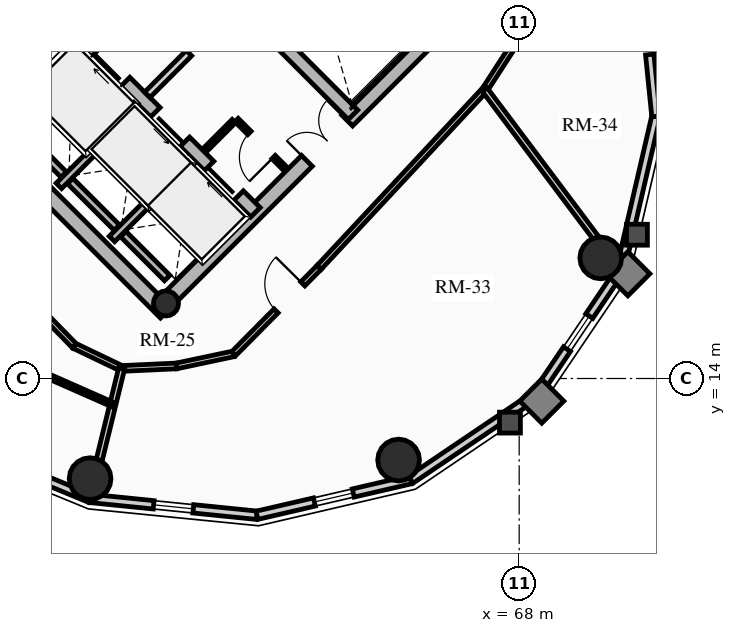
"""IFC4 building model, lengths in metres.
Left out: names, types, materials, properties, quantities, classifications, styles, units other than length and angle.
Written with IfcOpenShell. Run it as: python <this file> out.ifc"""

import sys

from ifc_helpers import new_model, si_unit, direction, frame, frame_2d, origin, origin_2d, place, context, subcontext, project, spatial, rectangle, circle, hollow_circle, extrude, source, transform, mapped, element, fill, save


model = new_model("IFC4")
c1 = context("Model", 3, precision=1e-05, world=origin(), true_north=direction((0.0, 1.0)))
c2 = subcontext(c1, "Body", "Model", "MODEL_VIEW")
j1 = project(units=[si_unit("LENGTHUNIT", "METRE"), si_unit("PLANEANGLEUNIT", "RADIAN")], contexts=[c1])
p1 = place(None, origin())
s1 = spatial("IfcSite", under=j1, at=p1, CompositionType="ELEMENT")
p2 = place(p1, origin())
s2 = spatial("IfcBuilding", under=s1, at=p2, CompositionType="ELEMENT")
p3 = place(p2, frame((0.0, 0.0, 214.12)))
s3 = spatial("IfcBuildingStorey", under=s2, at=p3, CompositionType="ELEMENT", Elevation=214.12)
p4 = place(p3, frame((58.702, 15.732, 0.0), z_axis=(0.0, 0.0, 1.0), x_axis=(-0.707106781187, 0.707106781187, 0.0)))
e1 = element("IfcWall", 1, at=p4, inside=s3, PredefinedType="SHEAR", context=c2, shape_type="SweptSolid", body=[
    extrude(rectangle(XDim=14.1, YDim=0.4, at=frame_2d((7.05, 0.0))), origin(), (0.0, 0.0, 1.0), 2.91),
])
p5 = place(p3, frame((58.561, 15.873, 0.0), z_axis=(0.0, 0.0, 1.0), x_axis=(0.707106781187, 0.707106781187, 0.0)))
e2 = element("IfcWall", 2, at=p5, inside=s3, PredefinedType="SHEAR", context=c2, shape_type="SweptSolid", body=[
    extrude(rectangle(XDim=10.7, YDim=0.4, at=frame_2d((5.35, 0.0))), origin(), (0.0, 0.0, 1.0), 2.91),
])
m1 = source(origin(), c2, "Body", "SweptSolid", [
    extrude(rectangle(XDim=1.5, YDim=2.02, at=frame_2d((0.75, 1.01))), frame((0.0, 0.21, 0.0), z_axis=(0.0, -1.0, 0.0), x_axis=(1.0, 0.0, 0.0)), (0.0, 0.0, 1.0), 0.42),
])
p6 = place(p5, frame((5.45, 0.0, 0.0)))
e3 = element("IfcOpeningElement", 3, at=p6, cuts=e2, PredefinedType="OPENING", context=c2, shape_type="MappedRepresentation", body=[
    mapped(m1, transform((0.0, 0.0, 0.0), x_axis=(1.0, 0.0, 0.0), y_axis=(0.0, 1.0, 0.0), z_axis=(0.0, 0.0, 1.0), scale=1.0)),
])
p7 = place(p3, frame((61.06, 18.373, 0.0), z_axis=(0.0, 0.0, 1.0), x_axis=(-0.707106781187, 0.707106781187, 0.0)))
e4 = element("IfcWall", 4, at=p7, inside=s3, PredefinedType="SHEAR", context=c2, shape_type="SweptSolid", body=[
    extrude(rectangle(XDim=13.7, YDim=0.35, at=frame_2d((6.85, 0.0))), origin(), (0.0, 0.0, 1.0), 2.91),
])
m2 = source(origin(), c2, "Body", "SweptSolid", [
    extrude(rectangle(XDim=1.1, YDim=2.015, at=frame_2d((0.55, 1.007))), frame((0.0, 0.185, 0.0), z_axis=(0.0, -1.0, 0.0), x_axis=(1.0, 0.0, 0.0)), (0.0, 0.0, 1.0), 0.37),
])
p8 = place(p7, frame((4.85, 0.0, 0.0)))
e5 = element("IfcOpeningElement", 5, at=p8, cuts=e4, PredefinedType="OPENING", context=c2, shape_type="MappedRepresentation", body=[
    mapped(m2, transform((0.0, 0.0, 0.0), x_axis=(1.0, 0.0, 0.0), y_axis=(0.0, 1.0, 0.0), z_axis=(0.0, 0.0, 1.0), scale=1.0)),
])
p9 = place(p7, frame((0.625, 0.0, 0.0)))
e6 = element("IfcOpeningElement", 6, at=p9, cuts=e4, PredefinedType="OPENING", context=c2, shape_type="MappedRepresentation", body=[
    mapped(m2, transform((0.0, 0.0, 0.0), x_axis=(1.0, 0.0, 0.0), y_axis=(0.0, 1.0, 0.0), z_axis=(0.0, 0.0, 1.0), scale=1.0)),
])
p10 = place(p7, frame((2.625, 0.0, 0.0)))
e7 = element("IfcOpeningElement", 7, at=p10, cuts=e4, PredefinedType="OPENING", context=c2, shape_type="MappedRepresentation", body=[
    mapped(m2, transform((0.0, 0.0, 0.0), x_axis=(1.0, 0.0, 0.0), y_axis=(0.0, 1.0, 0.0), z_axis=(0.0, 0.0, 1.0), scale=1.0)),
])
m3 = source(origin(), c2, "Body", "SweptSolid", [
    extrude(rectangle(XDim=1.15, YDim=2.02, at=frame_2d((0.575, 1.01))), frame((0.0, 0.185, 0.0), z_axis=(0.0, -1.0, 0.0), x_axis=(1.0, 0.0, 0.0)), (0.0, 0.0, 1.0), 0.37),
])
p11 = place(p7, frame((7.27, 0.0, 0.0)))
e8 = element("IfcOpeningElement", 8, at=p11, cuts=e4, PredefinedType="OPENING", context=c2, shape_type="MappedRepresentation", body=[
    mapped(m3, transform((0.0, 0.0, 0.0), x_axis=(1.0, 0.0, 0.0), y_axis=(0.0, 1.0, 0.0), z_axis=(0.0, 0.0, 1.0), scale=1.0)),
])
p12 = place(p3, frame((63.627, 20.94, 0.0), z_axis=(0.0, 0.0, 1.0), x_axis=(-0.707119496762, 0.707094065383, 0.0)))
e9 = element("IfcWall", 9, at=p12, inside=s3, PredefinedType="SHEAR", context=c2, shape_type="SweptSolid", body=[
    extrude(rectangle(XDim=9.6, YDim=0.35, at=frame_2d((4.8, 0.0))), origin(), (0.0, 0.0, 1.0), 2.91),
])
p13 = place(p12, frame((5.28, 0.0, 0.0)))
e10 = element("IfcOpeningElement", 10, at=p13, cuts=e9, PredefinedType="OPENING", context=c2, shape_type="MappedRepresentation", body=[
    mapped(m3, transform((0.0, 0.0, 0.0), x_axis=(1.0, 0.0, 0.0), y_axis=(0.0, 1.0, 0.0), z_axis=(0.0, 0.0, 1.0), scale=1.0)),
])
p14 = place(p3, frame((53.784, 21.003, 0.0), z_axis=(0.0, 0.0, 1.0), x_axis=(0.707106781187, 0.707106781187, 0.0)))
e11 = element("IfcWall", 11, at=p14, inside=s3, PredefinedType="SHEAR", context=c2, shape_type="SweptSolid", body=[
    extrude(rectangle(XDim=3.285, YDim=0.35, at=frame_2d((1.643, 0.0))), origin(), (0.0, 0.0, 1.0), 2.91),
])
p15 = place(p3, frame((58.706, 15.976, 0.0), z_axis=(0.0, 0.0, 1.0), x_axis=(0.707106781187, 0.707106781187, 0.0)))
e12 = element("IfcColumn", 12, at=p15, inside=s3, PredefinedType="COLUMN", context=c2, shape_type="SweptSolid", body=[
    extrude(hollow_circle(Radius=0.33, WallThickness=0.025, at=origin_2d()), origin(), (0.0, 0.0, 1.0), 2.91),
])
for number, where, z_axis, x_axis in (
    (13, (56.709, 11.365, 0.0), (0.0, 0.0, 1.0), (1.0, 0.0, 0.0)),
    (14, (64.827, 11.854, 0.0), (0.0, 0.0, 1.0), (1.0, 0.0, 0.0)),
    (15, (70.146, 17.173, 0.0), (0.0, 0.0, 1.0), (1.0, 0.0, 0.0)),
):
    element("IfcColumn", number, at=place(p3, frame(where, z_axis=z_axis, x_axis=x_axis)), inside=s3, PredefinedType="USERDEFINED", context=c2, shape_type="SweptSolid", body=[
        extrude(circle(Radius=0.55, at=origin_2d()), origin(), (0.0, 0.0, 1.0), 2.91),
    ])
p16 = place(p3, frame((56.705, 10.845, 0.0), z_axis=(0.0, 0.0, 1.0), x_axis=(-0.924447353237, 0.381309704956, 0.0)))
e16 = element("IfcWall", 16, at=p16, inside=s3, PredefinedType="SOLIDWALL", context=c2, shape_type="SweptSolid", body=[
    extrude(rectangle(XDim=4.671, YDim=0.22, at=frame_2d((2.335, 0.0))), origin(), (0.0, 0.0, 1.0), 2.322),
])
p17 = place(p3, frame((61.1, 10.401, 0.0), z_axis=(0.0, 0.0, 1.0), x_axis=(-0.994929930991, 0.100570534541, 0.0)))
e17 = element("IfcWall", 17, at=p17, inside=s3, PredefinedType="SOLIDWALL", context=c2, shape_type="SweptSolid", body=[
    extrude(rectangle(XDim=4.418, YDim=0.22, at=frame_2d((2.209, 0.0))), origin(), (0.0, 0.0, 1.0), 2.322),
])
m4 = source(origin(), c2, "Body", "SweptSolid", [
    extrude(rectangle(XDim=1.05, YDim=1.3, at=frame_2d((0.525, 0.65))), frame((0.0, 0.12, 0.0), z_axis=(0.0, -1.0, 0.0), x_axis=(1.0, 0.0, 0.0)), (0.0, 0.0, 1.0), 0.24),
])
p18 = place(p17, frame((1.684, 0.0, 0.65)))
e18 = element("IfcOpeningElement", 18, at=p18, cuts=e17, PredefinedType="OPENING", context=c2, shape_type="MappedRepresentation", body=[
    mapped(m4, transform((0.0, 0.0, 0.0), x_axis=(1.0, 0.0, 0.0), y_axis=(0.0, 1.0, 0.0), z_axis=(0.0, 0.0, 1.0), scale=1.0)),
])
p19 = place(p3, frame((65.144, 11.337, 0.0), z_axis=(0.0, 0.0, 1.0), x_axis=(-0.974249228678, -0.225473813158, 0.0)))
e19 = element("IfcWall", 19, at=p19, inside=s3, PredefinedType="SOLIDWALL", context=c2, shape_type="SweptSolid", body=[
    extrude(rectangle(XDim=4.15, YDim=0.22, at=frame_2d((2.075, 0.0))), origin(), (0.0, 0.0, 1.0), 2.322),
])
p20 = place(p19, frame((1.55, 0.0, 0.65)))
e20 = element("IfcOpeningElement", 20, at=p20, cuts=e19, PredefinedType="OPENING", context=c2, shape_type="MappedRepresentation", body=[
    mapped(m4, transform((0.0, 0.0, 0.0), x_axis=(1.0, 0.0, 0.0), y_axis=(0.0, 1.0, 0.0), z_axis=(0.0, 0.0, 1.0), scale=1.0)),
])
p21 = place(p3, frame((68.439, 13.561, 0.0), z_axis=(0.0, 0.0, 1.0), x_axis=(-0.828833723692, -0.559495003079, 0.0)))
e21 = element("IfcWall", 21, at=p21, inside=s3, PredefinedType="SOLIDWALL", context=c2, shape_type="SweptSolid", body=[
    extrude(rectangle(XDim=3.976, YDim=0.22, at=frame_2d((1.988, 0.0))), origin(), (0.0, 0.0, 1.0), 2.322),
])
p22 = place(p3, frame((70.663, 16.856, 0.0), z_axis=(0.0, 0.0, 1.0), x_axis=(-0.559495003079, -0.828833723692, 0.0)))
e22 = element("IfcWall", 22, at=p22, inside=s3, PredefinedType="SOLIDWALL", context=c2, shape_type="SweptSolid", body=[
    extrude(rectangle(XDim=3.976, YDim=0.22, at=frame_2d((1.988, 0.0))), origin(), (0.0, 0.0, 1.0), 2.322),
])
p23 = place(p22, frame((1.463, 0.0, 0.65)))
e23 = element("IfcOpeningElement", 23, at=p23, cuts=e22, PredefinedType="OPENING", context=c2, shape_type="MappedRepresentation", body=[
    mapped(m4, transform((0.0, 0.0, 0.0), x_axis=(1.0, 0.0, 0.0), y_axis=(0.0, 1.0, 0.0), z_axis=(0.0, 0.0, 1.0), scale=1.0)),
])
p24 = place(p3, frame((71.599, 20.9, 0.0), z_axis=(0.0, 0.0, 1.0), x_axis=(-0.225473813158, -0.974249228678, 0.0)))
e24 = element("IfcWall", 24, at=p24, inside=s3, PredefinedType="SOLIDWALL", context=c2, shape_type="SweptSolid", body=[
    extrude(rectangle(XDim=4.15, YDim=0.22, at=frame_2d((2.075, 0.0))), origin(), (0.0, 0.0, 1.0), 2.322),
])
p25 = place(p3, frame((71.155, 25.295, 0.0), z_axis=(0.0, 0.0, 1.0), x_axis=(0.100570534541, -0.994929930991, 0.0)))
e25 = element("IfcWall", 25, at=p25, inside=s3, PredefinedType="SOLIDWALL", context=c2, shape_type="SweptSolid", body=[
    extrude(rectangle(XDim=4.418, YDim=0.22, at=frame_2d((2.209, 0.0))), origin(), (0.0, 0.0, 1.0), 2.322),
])
m5 = source(origin(), c2, "Body", "SweptSolid", [
    extrude(rectangle(XDim=1.15, YDim=2.005, at=frame_2d((0.575, 1.002))), frame((0.0, 0.12, 0.0), z_axis=(0.0, -1.0, 0.0), x_axis=(1.0, 0.0, 0.0)), (0.0, 0.0, 1.0), 0.24),
])
p26 = place(p25, frame((1.634, 0.0, 0.0)))
e26 = element("IfcOpeningElement", 26, at=p26, cuts=e25, PredefinedType="OPENING", context=c2, shape_type="MappedRepresentation", body=[
    mapped(m5, transform((0.0, 0.0, 0.0), x_axis=(1.0, 0.0, 0.0), y_axis=(0.0, 1.0, 0.0), z_axis=(0.0, 0.0, 1.0), scale=1.0)),
])
p27 = place(p3, frame((55.888, 19.069, 0.0), z_axis=(0.0, 0.0, 1.0), x_axis=(0.707106781187, 0.707106781187, 0.0)))
e27 = element("IfcWall", 27, at=p27, inside=s3, PredefinedType="SHEAR", context=c2, shape_type="SweptSolid", body=[
    extrude(rectangle(XDim=2.97, YDim=0.2, at=frame_2d((1.485, 0.0))), origin(), (0.0, 0.0, 1.0), 2.91),
])
p28 = place(p3, frame((56.015, 19.366, 0.0), z_axis=(0.0, 0.0, 1.0), x_axis=(-0.707106781187, 0.707106781187, 0.0)))
e28 = element("IfcWall", 28, at=p28, inside=s3, PredefinedType="SHEAR", context=c2, shape_type="SweptSolid", body=[
    extrude(rectangle(XDim=2.44, YDim=0.2, at=frame_2d((1.22, 0.0))), origin(), (0.0, 0.0, 1.0), 2.91),
])
p29 = place(p3, frame((57.284, 17.673, 0.0), z_axis=(0.0, 0.0, 1.0), x_axis=(0.707147878904, 0.70706568108, 0.0)))
e29 = element("IfcWall", 29, at=p29, inside=s3, PredefinedType="SHEAR", context=c2, shape_type="SweptSolid", body=[
    extrude(rectangle(XDim=2.97, YDim=0.2, at=frame_2d((1.485, 0.0))), origin(), (0.0, 0.0, 1.0), 2.91),
])
p30 = place(p3, frame((57.412, 17.97, 0.0), z_axis=(0.0, 0.0, 1.0), x_axis=(-0.707106781187, 0.707106781187, 0.0)))
e30 = element("IfcWall", 30, at=p30, inside=s3, PredefinedType="SHEAR", context=c2, shape_type="SweptSolid", body=[
    extrude(rectangle(XDim=1.735, YDim=0.2, at=frame_2d((0.867, 0.0))), origin(), (0.0, 0.0, 1.0), 2.91),
])
p31 = place(p3, frame((58.737, 16.644, 0.0), z_axis=(0.0, 0.0, 1.0), x_axis=(-0.707032117043, 0.707181437447, 0.0)))
e31 = element("IfcWall", 31, at=p31, inside=s3, PredefinedType="SHEAR", context=c2, shape_type="SweptSolid", body=[
    extrude(rectangle(XDim=1.635, YDim=0.2, at=frame_2d((0.817, 0.0))), origin(), (0.0, 0.0, 1.0), 2.91),
])
p32 = place(p3, frame((58.214, 21.467, 0.0), z_axis=(0.0, 0.0, 1.0), x_axis=(0.707106781187, 0.707106781187, 0.0)))
e32 = element("IfcWall", 32, at=p32, inside=s3, PredefinedType="PARTITIONING", context=c2, shape_type="SweptSolid", body=[
    extrude(rectangle(XDim=3.28, YDim=0.2, at=frame_2d((1.64, 0.0))), origin(), (0.0, 0.0, 1.0), 2.685),
])
m6 = source(origin(), c2, "Body", "SweptSolid", [
    extrude(rectangle(XDim=1.5, YDim=2.02, at=frame_2d((0.75, 1.01))), frame((0.0, 0.11, 0.0), z_axis=(0.0, -1.0, 0.0), x_axis=(1.0, 0.0, 0.0)), (0.0, 0.0, 1.0), 0.22),
])
p33 = place(p32, frame((1.55, 0.0, 0.0)))
e33 = element("IfcOpeningElement", 33, at=p33, cuts=e32, PredefinedType="OPENING", context=c2, shape_type="MappedRepresentation", body=[
    mapped(m6, transform((0.0, 0.0, 0.0), x_axis=(1.0, 0.0, 0.0), y_axis=(0.0, 1.0, 0.0), z_axis=(0.0, 0.0, 1.0), scale=1.0)),
])
p34 = place(p3, frame((61.835, 19.529, 0.0), z_axis=(0.0, 0.0, 1.0), x_axis=(-0.707174592913, 0.707038962956, 0.0)))
e34 = element("IfcWall", 34, at=p34, inside=s3, PredefinedType="PARTITIONING", context=c2, shape_type="SweptSolid", body=[
    extrude(rectangle(XDim=1.8, YDim=0.125, at=frame_2d((0.9, 0.0))), origin(), (0.0, 0.0, 1.0), 2.685),
])
m7 = source(origin(), c2, "Body", "SweptSolid", [
    extrude(rectangle(XDim=0.9, YDim=2.005, at=frame_2d((0.45, 1.002))), frame((0.0, 0.073, 0.0), z_axis=(0.0, -1.0, 0.0), x_axis=(1.0, 0.0, 0.0)), (0.0, 0.0, 1.0), 0.145),
])
p35 = place(p34, frame((0.42, 0.0, 0.0)))
e35 = element("IfcOpeningElement", 35, at=p35, cuts=e34, PredefinedType="OPENING", context=c2, shape_type="MappedRepresentation", body=[
    mapped(m7, transform((0.0, 0.0, 0.0), x_axis=(1.0, 0.0, 0.0), y_axis=(0.0, 1.0, 0.0), z_axis=(0.0, 0.0, 1.0), scale=1.0)),
])
p36 = place(p3, frame((59.713, 19.996, 0.0), z_axis=(0.0, 0.0, 1.0), x_axis=(0.707217726, 0.706995818963, 0.0)))
e36 = element("IfcWall", 36, at=p36, inside=s3, PredefinedType="PARTITIONING", context=c2, shape_type="SweptSolid", body=[
    extrude(rectangle(XDim=1.1, YDim=0.125, at=frame_2d((0.55, 0.0))), origin(), (0.0, 0.0, 1.0), 2.685),
])
p37 = place(p3, frame((52.126, 19.126, 0.0), z_axis=(0.0, 0.0, 1.0), x_axis=(0.698979087027, -0.715142108884, 0.0)))
e37 = element("IfcWall", 37, at=p37, inside=s3, PredefinedType="PARTITIONING", context=c2, shape_type="SweptSolid", body=[
    extrude(rectangle(XDim=5.966, YDim=0.15, at=frame_2d((2.983, 0.0))), origin(), (0.0, 0.0, 1.0), 2.322),
])
m8 = source(origin(), c2, "Body", "SweptSolid", [
    extrude(rectangle(XDim=1.05, YDim=2.015, at=frame_2d((0.525, 1.007))), frame((0.0, 0.085, 0.0), z_axis=(0.0, -1.0, 0.0), x_axis=(1.0, 0.0, 0.0)), (0.0, 0.0, 1.0), 0.17),
])
p38 = place(p37, frame((2.458, 0.0, 0.0)))
e38 = element("IfcOpeningElement", 38, at=p38, cuts=e37, PredefinedType="OPENING", context=c2, shape_type="MappedRepresentation", body=[
    mapped(m8, transform((0.0, 0.0, 0.0), x_axis=(1.0, 0.0, 0.0), y_axis=(0.0, 1.0, 0.0), z_axis=(0.0, 0.0, 1.0), scale=1.0)),
])
p39 = place(p3, frame((56.296, 14.859, 0.0), z_axis=(0.0, 0.0, 1.0), x_axis=(0.90178292445, -0.432189260823, 0.0)))
e39 = element("IfcWall", 39, at=p39, inside=s3, PredefinedType="PARTITIONING", context=c2, shape_type="SweptSolid", body=[
    extrude(rectangle(XDim=1.377, YDim=0.15, at=frame_2d((0.688, 0.0))), origin(), (0.0, 0.0, 1.0), 2.255),
])
p40 = place(p3, frame((57.538, 14.264, 0.0), z_axis=(0.0, 0.0, 1.0), x_axis=(0.99892990172, 0.046249880546, 0.0)))
e40 = element("IfcWall", 40, at=p40, inside=s3, PredefinedType="PARTITIONING", context=c2, shape_type="SweptSolid", body=[
    extrude(rectangle(XDim=1.446, YDim=0.15, at=frame_2d((0.723, 0.0))), origin(), (0.0, 0.0, 1.0), 2.322),
])
p41 = place(p3, frame((58.983, 14.331, 0.0), z_axis=(0.0, 0.0, 1.0), x_axis=(0.978328007546, 0.207061125397, 0.0)))
e41 = element("IfcWall", 41, at=p41, inside=s3, PredefinedType="PARTITIONING", context=c2, shape_type="SweptSolid", body=[
    extrude(rectangle(XDim=1.534, YDim=0.15, at=frame_2d((0.767, 0.0))), origin(), (0.0, 0.0, 1.0), 2.255),
])
p42 = place(p3, frame((60.484, 14.648, 0.0), z_axis=(0.0, 0.0, 1.0), x_axis=(0.703398221944, 0.710795991383, 0.0)))
e42 = element("IfcWall", 42, at=p42, inside=s3, PredefinedType="PARTITIONING", context=c2, shape_type="SweptSolid", body=[
    extrude(rectangle(XDim=3.201, YDim=0.15, at=frame_2d((1.601, 0.0))), origin(), (0.0, 0.0, 1.0), 2.322),
])
m9 = source(origin(), c2, "Body", "SweptSolid", [
    extrude(rectangle(XDim=1.0, YDim=2.015, at=frame_2d((0.5, 1.007))), frame((0.0, 0.085, 0.0), z_axis=(0.0, -1.0, 0.0), x_axis=(1.0, 0.0, 0.0)), (0.0, 0.0, 1.0), 0.17),
])
p43 = place(p42, frame((1.591, 0.0, 0.0)))
e43 = element("IfcOpeningElement", 43, at=p43, cuts=e42, PredefinedType="OPENING", context=c2, shape_type="MappedRepresentation", body=[
    mapped(m9, transform((0.0, 0.0, 0.0), x_axis=(1.0, 0.0, 0.0), y_axis=(0.0, 1.0, 0.0), z_axis=(0.0, 0.0, 1.0), scale=1.0)),
])
p44 = place(p3, frame((62.736, 16.924, 0.0), z_axis=(0.0, 0.0, 1.0), x_axis=(0.681946700833, 0.731401871219, 0.0)))
e44 = element("IfcWall", 44, at=p44, inside=s3, PredefinedType="PARTITIONING", context=c2, shape_type="SweptSolid", body=[
    extrude(rectangle(XDim=6.393, YDim=0.15, at=frame_2d((3.196, 0.0))), origin(), (0.0, 0.0, 1.0), 2.255),
])
p45 = place(p3, frame((67.095, 21.6, 0.0), z_axis=(0.0, 0.0, 1.0), x_axis=(0.543773190184, 0.839232219137, 0.0)))
e45 = element("IfcWall", 45, at=p45, inside=s3, PredefinedType="PARTITIONING", context=c2, shape_type="SweptSolid", body=[
    extrude(rectangle(XDim=1.823, YDim=0.15, at=frame_2d((0.911, 0.0))), origin(), (0.0, 0.0, 1.0), 2.255),
])
p46 = place(p3, frame((57.538, 14.264, 0.0), z_axis=(0.0, 0.0, 1.0), x_axis=(-0.237377006249, -0.971417601706, 0.0)))
e46 = element("IfcWall", 46, at=p46, inside=s3, PredefinedType="PARTITIONING", context=c2, shape_type="SweptSolid", body=[
    extrude(rectangle(XDim=3.499, YDim=0.16, at=frame_2d((1.75, 0.0))), origin(), (0.0, 0.0, 1.0), 2.322),
])
p47 = place(p3, frame((67.095, 21.6, 0.0), z_axis=(0.0, 0.0, 1.0), x_axis=(0.599947190798, -0.800039604178, 0.0)))
e47 = element("IfcWall", 47, at=p47, inside=s3, PredefinedType="PARTITIONING", context=c2, shape_type="SweptSolid", body=[
    extrude(rectangle(XDim=5.918, YDim=0.16, at=frame_2d((2.959, 0.0))), origin(), (0.0, 0.0, 1.0), 2.322),
])
p48 = place(p3, frame((55.204, 14.239, 0.0), z_axis=(0.0, 0.0, 1.0), x_axis=(0.914999746908, -0.403454412738, 0.0)))
e48 = element("IfcWall", 48, at=p48, inside=s3, PredefinedType="PARTITIONING", context=c2, shape_type="SweptSolid", body=[
    extrude(rectangle(XDim=2.297, YDim=0.125, at=frame_2d((1.148, 0.0))), origin(), (0.0, 0.0, 1.0), 2.255),
])
m10 = source(origin(), c2, "Body", "SweptSolid", [
    extrude(rectangle(XDim=1.05, YDim=1.3, at=frame_2d((0.525, 0.65))), frame((0.0, 0.03, 0.0), z_axis=(0.0, -1.0, 0.0), x_axis=(1.0, 0.0, 0.0)), (0.0, 0.0, 1.0), 0.06),
])
p49 = place(p18, origin())
e49 = element("IfcWindow", 49, at=p49, inside=s3, PartitioningType="SINGLE_PANEL", PredefinedType="WINDOW", context=c2, shape_type="MappedRepresentation", body=[
    mapped(m10, transform((0.0, 0.0, 0.0), x_axis=(1.0, 0.0, 0.0), y_axis=(0.0, 1.0, 0.0), z_axis=(0.0, 0.0, 1.0), scale=1.0)),
])
fill(e18, e49)
p50 = place(p20, origin())
e50 = element("IfcWindow", 50, at=p50, inside=s3, PartitioningType="SINGLE_PANEL", PredefinedType="WINDOW", context=c2, shape_type="MappedRepresentation", body=[
    mapped(m10, transform((0.0, 0.0, 0.0), x_axis=(1.0, 0.0, 0.0), y_axis=(0.0, 1.0, 0.0), z_axis=(0.0, 0.0, 1.0), scale=1.0)),
])
fill(e20, e50)
p51 = place(p23, origin())
e51 = element("IfcWindow", 51, at=p51, inside=s3, PartitioningType="SINGLE_PANEL", PredefinedType="WINDOW", context=c2, shape_type="MappedRepresentation", body=[
    mapped(m10, transform((0.0, 0.0, 0.0), x_axis=(1.0, 0.0, 0.0), y_axis=(0.0, 1.0, 0.0), z_axis=(0.0, 0.0, 1.0), scale=1.0)),
])
fill(e23, e51)
m11 = source(origin(), c2, "Body", "SweptSolid", [
    extrude(rectangle(XDim=1.15, YDim=2.005, at=frame_2d((0.575, 1.002))), frame((0.0, 0.025, 0.0), z_axis=(0.0, -1.0, 0.0), x_axis=(1.0, 0.0, 0.0)), (0.0, 0.0, 1.0), 0.05),
])
p52 = place(p26, origin())
e52 = element("IfcDoor", 52, at=p52, inside=s3, OperationType="SINGLE_SWING_LEFT", PredefinedType="DOOR", context=c2, shape_type="MappedRepresentation", body=[
    mapped(m11, transform((0.0, 0.0, 0.0), x_axis=(1.0, 0.0, 0.0), y_axis=(0.0, 1.0, 0.0), z_axis=(0.0, 0.0, 1.0), scale=1.0)),
])
fill(e26, e52)
m12 = source(origin(), c2, "Body", "SweptSolid", [
    extrude(rectangle(XDim=1.1, YDim=2.015, at=frame_2d((0.55, 1.007))), frame((0.0, 0.025, 0.0), z_axis=(0.0, -1.0, 0.0), x_axis=(1.0, 0.0, 0.0)), (0.0, 0.0, 1.0), 0.05),
])
p53 = place(p8, origin())
e53 = element("IfcDoor", 53, at=p53, inside=s3, OperationType="SLIDING_TO_RIGHT", PredefinedType="DOOR", context=c2, shape_type="MappedRepresentation", body=[
    mapped(m12, transform((0.0, 0.0, 0.0), x_axis=(1.0, 0.0, 0.0), y_axis=(0.0, 1.0, 0.0), z_axis=(0.0, 0.0, 1.0), scale=1.0)),
])
fill(e5, e53)
p54 = place(p9, origin())
e54 = element("IfcDoor", 54, at=p54, inside=s3, OperationType="SLIDING_TO_RIGHT", PredefinedType="DOOR", context=c2, shape_type="MappedRepresentation", body=[
    mapped(m12, transform((0.0, 0.0, 0.0), x_axis=(1.0, 0.0, 0.0), y_axis=(0.0, 1.0, 0.0), z_axis=(0.0, 0.0, 1.0), scale=1.0)),
])
fill(e6, e54)
p55 = place(p10, origin())
e55 = element("IfcDoor", 55, at=p55, inside=s3, OperationType="SLIDING_TO_LEFT", PredefinedType="DOOR", context=c2, shape_type="MappedRepresentation", body=[
    mapped(m12, transform((0.0, 0.0, 0.0), x_axis=(1.0, 0.0, 0.0), y_axis=(0.0, 1.0, 0.0), z_axis=(0.0, 0.0, 1.0), scale=1.0)),
])
fill(e7, e55)
m13 = source(origin(), c2, "Body", "SweptSolid", [
    extrude(rectangle(XDim=1.5, YDim=2.02, at=frame_2d((0.75, 1.01))), frame((0.0, 0.025, 0.0), z_axis=(0.0, -1.0, 0.0), x_axis=(1.0, 0.0, 0.0)), (0.0, 0.0, 1.0), 0.05),
])
p56 = place(p6, origin())
e56 = element("IfcDoor", 56, at=p56, inside=s3, OperationType="DOUBLE_DOOR_SINGLE_SWING", PredefinedType="DOOR", context=c2, shape_type="MappedRepresentation", body=[
    mapped(m13, transform((0.0, 0.0, 0.0), x_axis=(1.0, 0.0, 0.0), y_axis=(0.0, 1.0, 0.0), z_axis=(0.0, 0.0, 1.0), scale=1.0)),
])
fill(e3, e56)
p57 = place(p33, origin())
e57 = element("IfcDoor", 57, at=p57, inside=s3, OperationType="DOUBLE_DOOR_SINGLE_SWING", PredefinedType="DOOR", context=c2, shape_type="MappedRepresentation", body=[
    mapped(m13, transform((0.0, 0.0, 0.0), x_axis=(1.0, 0.0, 0.0), y_axis=(0.0, 1.0, 0.0), z_axis=(0.0, 0.0, 1.0), scale=1.0)),
])
fill(e33, e57)
m14 = source(origin(), c2, "Body", "SweptSolid", [
    extrude(rectangle(XDim=0.9, YDim=2.005, at=frame_2d((0.45, 1.002))), frame((0.0, 0.025, 0.0), z_axis=(0.0, -1.0, 0.0), x_axis=(1.0, 0.0, 0.0)), (0.0, 0.0, 1.0), 0.05),
])
p58 = place(p35, origin())
e58 = element("IfcDoor", 58, at=p58, inside=s3, OperationType="SINGLE_SWING_LEFT", PredefinedType="DOOR", context=c2, shape_type="MappedRepresentation", body=[
    mapped(m14, transform((0.0, 0.0, 0.0), x_axis=(1.0, 0.0, 0.0), y_axis=(0.0, 1.0, 0.0), z_axis=(0.0, 0.0, 1.0), scale=1.0)),
])
fill(e35, e58)
m15 = source(origin(), c2, "Body", "SweptSolid", [
    extrude(rectangle(XDim=1.0, YDim=2.015, at=frame_2d((0.5, 1.007))), frame((0.0, 0.025, 0.0), z_axis=(0.0, -1.0, 0.0), x_axis=(1.0, 0.0, 0.0)), (0.0, 0.0, 1.0), 0.05),
])
p59 = place(p43, origin())
e59 = element("IfcDoor", 59, at=p59, inside=s3, OperationType="SINGLE_SWING_RIGHT", PredefinedType="DOOR", context=c2, shape_type="MappedRepresentation", body=[
    mapped(m15, transform((0.0, 0.0, 0.0), x_axis=(1.0, 0.0, 0.0), y_axis=(0.0, 1.0, 0.0), z_axis=(0.0, 0.0, 1.0), scale=1.0)),
])
fill(e43, e59)
save(model, sys.argv[1])
